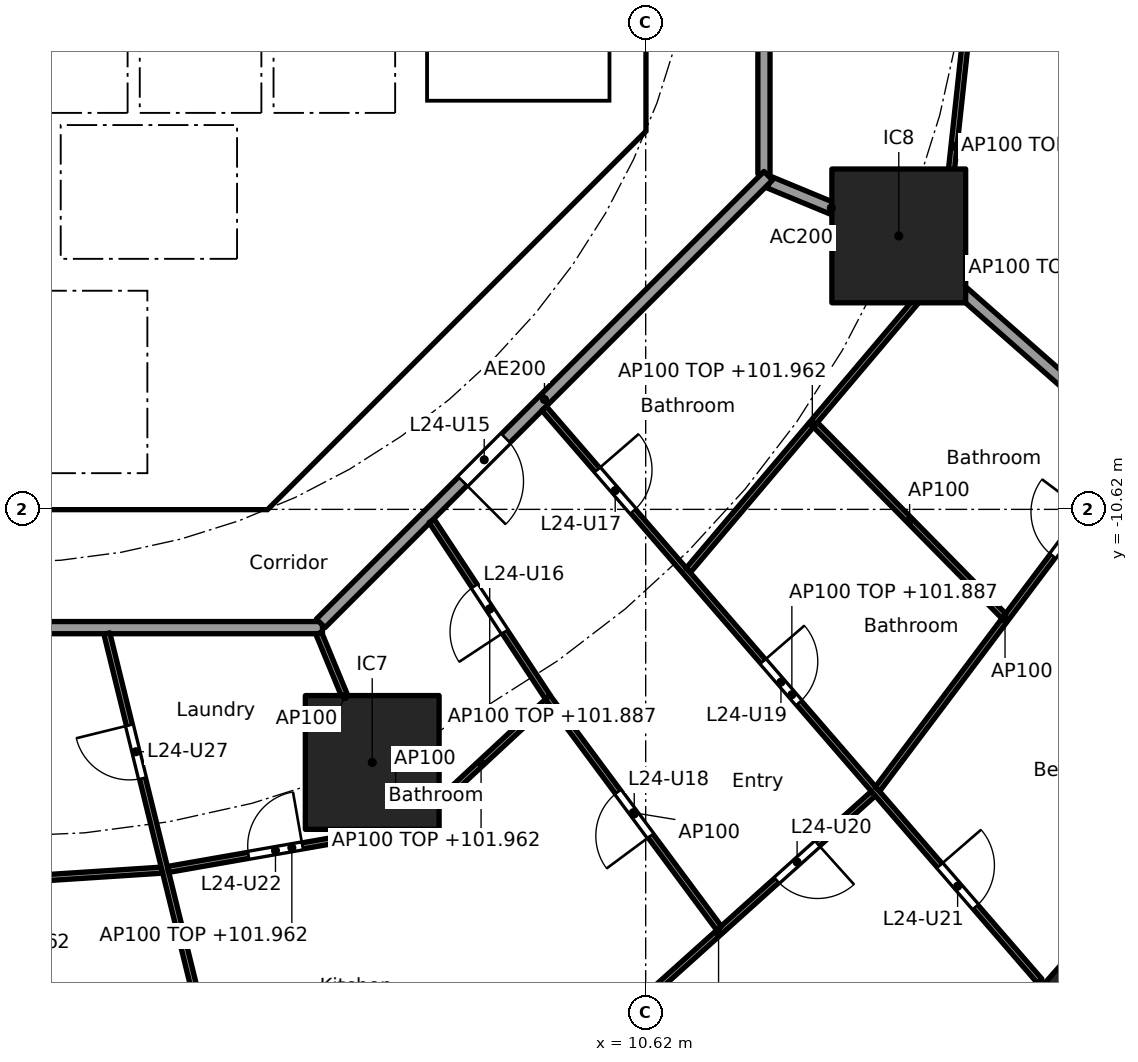
"""IFC4 building model, lengths in metres.
Left out: names, types, materials, properties, quantities, classifications, styles, units other than length and angle.
Written with IfcOpenShell. Run it as: python <this file> out.ifc"""

import sys

from ifc_helpers import new_model, si_unit, direction, frame, frame_2d, origin, origin_2d, place, context, subcontext, project, spatial, polyline, rectangle, hollow_rectangle, outline, extrude, element, fill, save


model = new_model("IFC4")
c1 = context("Model", 3, precision=1e-05, world=origin(), true_north=direction((0.0, 1.0)))
c2 = subcontext(c1, "Body", "Model", "MODEL_VIEW")
j1 = project(units=[si_unit("LENGTHUNIT", "METRE"), si_unit("PLANEANGLEUNIT", "RADIAN")], contexts=[c1])
p1 = place(None, origin())
s1 = spatial("IfcSite", under=j1, at=p1, CompositionType="ELEMENT")
p2 = place(p1, origin())
s2 = spatial("IfcBuilding", under=s1, at=p2, CompositionType="ELEMENT")
p3 = place(p2, frame((0.0, 0.0, 99.2)))
s3 = spatial("IfcBuildingStorey", under=s2, at=p3, CompositionType="ELEMENT", Elevation=99.2)
p4 = place(p3, frame((17.43, -18.813, 0.0), z_axis=(0.0, 0.0, 1.0), x_axis=(0.660114607735, 0.751164898445, 0.0)))
e1 = element("IfcColumn", 1, at=p4, inside=s3, PredefinedType="COLUMN", context=c2, shape_type="SweptSolid", body=[
    extrude(hollow_rectangle(XDim=1.3, YDim=0.9, WallThickness=0.045, at=origin_2d()), origin(), (0.0, 0.0, 1.0), 3.7),
])
for number, where, z_axis, x_axis in (
    (2, (6.123, -14.782, 0.0), (0.0, 0.0, 1.0), (1.0, 0.0, 0.0)),
    (3, (14.782, -6.123, 0.0), (0.0, 0.0, 1.0), (1.0, 0.0, 0.0)),
):
    element("IfcColumn", number, at=place(p3, frame(where, z_axis=z_axis, x_axis=x_axis)), inside=s3, PredefinedType="COLUMN", context=c2, shape_type="SweptSolid", body=[
        extrude(rectangle(XDim=2.2, YDim=2.2, at=origin_2d()), origin(), (0.0, 0.0, 1.0), 3.7),
    ])
p5 = place(p3, frame((4.613, -9.988, 0.0), z_axis=(0.0, 0.0, 1.0), x_axis=(0.707106781187, 0.707106781187, 0.0)))
e4 = element("IfcWall", 4, at=p5, inside=s3, PredefinedType="SHEAR", context=c2, shape_type="SweptSolid", body=[
    extrude(rectangle(XDim=7.602, YDim=0.6, at=frame_2d((3.801, 0.0))), origin(), (0.0, 0.0, 1.0), 3.44),
])
p6 = place(p5, frame((3.201, 0.0, 0.0)))
e5 = element("IfcOpeningElement", 5, at=p6, cuts=e4, PredefinedType="OPENING", context=c2, shape_type="SweptSolid", body=[
    extrude(rectangle(XDim=1.2, YDim=2.1, at=frame_2d((0.6, 1.05))), frame((0.0, 0.31, 0.0), z_axis=(0.0, -1.0, 0.0), x_axis=(1.0, 0.0, 0.0)), (0.0, 0.0, 1.0), 0.62),
])
p7 = place(p3, frame((4.0, -10.025, 0.0), z_axis=(0.0, 0.0, 1.0), x_axis=(0.0, 1.0, 0.0)))
e6 = element("IfcWall", 6, at=p7, inside=s3, PredefinedType="SOLIDWALL", context=c2, shape_type="SweptSolid", body=[
    extrude(rectangle(XDim=3.0, YDim=0.2, at=frame_2d((1.5, 0.0))), origin(), (0.0, 0.0, 1.0), 3.44),
])
p8 = place(p7, frame((0.975, 0.0, 0.0)))
e7 = element("IfcOpeningElement", 7, at=p8, cuts=e6, PredefinedType="OPENING", context=c2, shape_type="SweptSolid", body=[
    extrude(rectangle(XDim=1.1, YDim=2.1, at=frame_2d((0.55, 1.05))), frame((0.0, 0.11, 0.0), z_axis=(0.0, -1.0, 0.0), x_axis=(1.0, 0.0, 0.0)), (0.0, 0.0, 1.0), 0.22),
])
p9 = place(p3, frame((4.0, -6.5, 0.0), z_axis=(0.0, 0.0, 1.0), x_axis=(0.0, 1.0, 0.0)))
e8 = element("IfcWall", 8, at=p9, inside=s3, PredefinedType="SOLIDWALL", context=c2, shape_type="SweptSolid", body=[
    extrude(rectangle(XDim=2.2, YDim=0.2, at=frame_2d((1.1, 0.0))), origin(), (0.0, 0.0, 1.0), 3.44),
])
p10 = place(p9, frame((0.55, 0.0, 0.0)))
e9 = element("IfcOpeningElement", 9, at=p10, cuts=e8, PredefinedType="OPENING", context=c2, shape_type="SweptSolid", body=[
    extrude(rectangle(XDim=1.1, YDim=2.1, at=frame_2d((0.55, 1.05))), frame((0.0, 0.11, 0.0), z_axis=(0.0, -1.0, 0.0), x_axis=(1.0, 0.0, 0.0)), (0.0, 0.0, 1.0), 0.22),
])
p11 = place(p3, origin())
e10 = element("IfcWall", 10, at=p11, inside=s3, PredefinedType="SHEAR", context=c2, shape_type="SweptSolid", body=[
    extrude(outline(polyline([(-4.152, -10.025), (4.152, -10.025), (4.401, -9.776), (4.825, -10.2), (4.401, -10.625), (-4.401, -10.625), (-4.825, -10.2), (-4.401, -9.776), (-4.152, -10.025)])), origin(), (0.0, 0.0, 1.0), 3.44),
])
p12 = place(p3, origin())
e11 = element("IfcWall", 11, at=p12, inside=s3, PredefinedType="SHEAR", context=c2, shape_type="SweptSolid", body=[
    extrude(outline(polyline([(9.776, -4.401), (10.025, -4.152), (10.025, -3.801), (10.025, 4.152), (9.776, 4.401), (10.2, 4.825), (10.625, 4.401), (10.625, -4.401), (10.2, -4.825), (9.776, -4.401)])), origin(), (0.0, 0.0, 1.0), 3.44),
])
p13 = place(p3, frame((0.9, -6.5, 0.0), z_axis=(0.0, 0.0, 1.0), x_axis=(0.0, 1.0, 0.0)))
e12 = element("IfcWall", 12, at=p13, inside=s3, PredefinedType="SOLIDWALL", context=c2, shape_type="SweptSolid", body=[
    extrude(rectangle(XDim=2.2, YDim=0.2, at=frame_2d((1.1, 0.0))), origin(), (0.0, 0.0, 1.0), 3.44),
])
p14 = place(p3, origin())
e13 = element("IfcWall", 13, at=p14, inside=s3, PredefinedType="SOLIDWALL", context=c2, shape_type="SweptSolid", body=[
    extrude(outline(polyline([(-6.7, -2.1), (-6.5, -2.1), (-6.5, -4.1), (-4.5, -4.1), (-4.5, -2.1), (-4.3, -2.1), (-4.3, -4.1), (-2.3, -4.1), (-2.3, -2.1), (-2.1, -2.1), (-2.1, -4.1), (-0.1, -4.1), (-0.1, -2.1), (0.1, -2.1), (0.1, -4.1), (2.1, -4.1), (2.1, -2.1), (2.3, -2.1), (2.3, -4.1), (4.3, -4.1), (4.3, -2.1), (4.5, -2.1), (4.5, -4.1), (6.5, -4.1), (6.5, -2.1), (6.7, -2.1), (6.7, -4.3), (-6.7, -4.3), (-6.7, -2.1)])), origin(), (0.0, 0.0, 1.0), 3.44),
])
p15 = place(p3, origin())
e14 = element("IfcWall", 14, at=p15, inside=s3, PredefinedType="SOLIDWALL", context=c2, shape_type="SweptSolid", body=[
    extrude(outline(polyline([(4.1, -7.025), (-4.1, -7.025), (-4.1, -6.5), (4.1, -6.5), (4.1, -7.025)])), origin(), (0.0, 0.0, 1.0), 3.44),
])
p16 = place(p3, origin())
e15 = element("IfcWall", 15, at=p16, inside=s3, PredefinedType="SOLIDWALL", context=c2, shape_type="SweptSolid", body=[
    extrude(outline(polyline([(7.025, -3.9), (6.7, -3.9), (6.7, 3.9), (7.025, 3.9), (7.025, -3.9)])), origin(), (0.0, 0.0, 1.0), 3.44),
])
p17 = place(p3, origin())
e16 = element("IfcWall", 16, at=p17, inside=s3, PredefinedType="SOLIDWALL", context=c2, shape_type="SweptSolid", body=[
    extrude(outline(polyline([(10.025, -4.1), (6.7, -4.1), (6.7, -3.9), (10.025, -3.9), (10.025, -4.1)])), origin(), (0.0, 0.0, 1.0), 3.44),
])
p18 = place(p3, frame((12.657, -5.243, 0.0), z_axis=(0.0, 0.0, 1.0), x_axis=(0.923876145736, -0.382691608661, 0.0)))
e17 = element("IfcWall", 17, at=p18, inside=s3, PredefinedType="PARTITIONING", context=c2, shape_type="SweptSolid", body=[
    extrude(rectangle(XDim=2.2, YDim=0.2, at=frame_2d((1.1, 0.0))), origin(), (0.0, 0.0, 1.0), 3.44),
])
p19 = place(p3, frame((14.82, -6.156, 0.0), z_axis=(0.0, 0.0, 1.0), x_axis=(0.750582231659, -0.660777052808, 0.0)))
e18 = element("IfcWall", 18, at=p19, inside=s3, PredefinedType="PARTITIONING", context=c2, shape_type="SweptSolid", body=[
    extrude(rectangle(XDim=8.781, YDim=0.2, at=frame_2d((4.391, 0.0))), origin(), (0.0, 0.0, 1.0), 2.762),
])
p20 = place(p3, frame((12.565, -5.104, 0.0), z_axis=(0.0, 0.0, 1.0), x_axis=(0.0, 1.0, 0.0)))
e19 = element("IfcWall", 19, at=p20, inside=s3, PredefinedType="PARTITIONING", context=c2, shape_type="SweptSolid", body=[
    extrude(rectangle(XDim=10.209, YDim=0.2, at=frame_2d((5.104, 0.0))), origin(), (0.0, 0.0, 1.0), 3.44),
])
p21 = place(p3, frame((-5.104, -12.565, 0.0), z_axis=(0.0, 0.0, 1.0), x_axis=(1.0, 0.0, 0.0)))
e20 = element("IfcWall", 20, at=p21, inside=s3, PredefinedType="PARTITIONING", context=c2, shape_type="SweptSolid", body=[
    extrude(rectangle(XDim=10.409, YDim=0.2, at=frame_2d((5.205, 0.0))), origin(), (0.0, 0.0, 1.0), 3.44),
])
p22 = place(p3, frame((5.275, -12.494, 0.0), z_axis=(0.0, 0.0, 1.0), x_axis=(0.707106781187, 0.707106781187, 0.0)))
e21 = element("IfcWall", 21, at=p22, inside=s3, PredefinedType="PARTITIONING", context=c2, shape_type="SweptSolid", body=[
    extrude(rectangle(XDim=10.409, YDim=0.2, at=frame_2d((5.205, 0.0))), origin(), (0.0, 0.0, 1.0), 3.44),
])
p23 = place(p22, frame((3.303, 0.0, 0.0)))
e22 = element("IfcOpeningElement", 22, at=p23, cuts=e21, PredefinedType="OPENING", context=c2, shape_type="SweptSolid", body=[
    extrude(rectangle(XDim=1.0, YDim=2.1, at=frame_2d((0.5, 1.05))), frame((0.0, 0.11, 0.0), z_axis=(0.0, -1.0, 0.0), x_axis=(1.0, 0.0, 0.0)), (0.0, 0.0, 1.0), 0.22),
])
p24 = place(p3, frame((-1.703, -16.836, 0.0), z_axis=(0.0, 0.0, 1.0), x_axis=(0.997897941075, 0.064805086209, 0.0)))
e23 = element("IfcWall", 23, at=p24, inside=s3, PredefinedType="PARTITIONING", context=c2, shape_type="SweptSolid", body=[
    extrude(rectangle(XDim=4.378, YDim=0.1, at=frame_2d((2.189, 0.0))), origin(), (0.0, 0.0, 1.0), 2.762),
])
p25 = place(p3, frame((1.759, -12.662, 0.0), z_axis=(0.0, 0.0, 1.0), x_axis=(0.239021819854, -0.971014196412, 0.0)))
e24 = element("IfcWall", 24, at=p25, inside=s3, PredefinedType="PARTITIONING", context=c2, shape_type="SweptSolid", body=[
    extrude(rectangle(XDim=14.05, YDim=0.1, at=frame_2d((7.025, 0.0))), origin(), (0.0, 0.0, 1.0), 2.687),
])
p26 = place(p25, frame((6.214, 0.0, 0.0)))
e25 = element("IfcOpeningElement", 25, at=p26, cuts=e24, PredefinedType="OPENING", context=c2, shape_type="SweptSolid", body=[
    extrude(rectangle(XDim=0.9, YDim=2.1, at=frame_2d((0.45, 1.05))), frame((0.0, 0.06, 0.0), z_axis=(0.0, -1.0, 0.0), x_axis=(1.0, 0.0, 0.0)), (0.0, 0.0, 1.0), 0.12),
])
p27 = place(p25, frame((1.552, 0.0, 0.0)))
e26 = element("IfcOpeningElement", 26, at=p27, cuts=e24, PredefinedType="OPENING", context=c2, shape_type="SweptSolid", body=[
    extrude(rectangle(XDim=0.9, YDim=2.1, at=frame_2d((0.45, 1.05))), frame((0.0, 0.06, 0.0), z_axis=(0.0, -1.0, 0.0), x_axis=(1.0, 0.0, 0.0)), (0.0, 0.0, 1.0), 0.12),
])
p28 = place(p3, frame((2.765, -16.541, 0.0), z_axis=(0.0, 0.0, 1.0), x_axis=(0.984998612286, 0.172562260633, 0.0)))
e27 = element("IfcWall", 27, at=p28, inside=s3, PredefinedType="PARTITIONING", context=c2, shape_type="SweptSolid", body=[
    extrude(rectangle(XDim=4.134, YDim=0.1, at=frame_2d((2.067, 0.0))), origin(), (0.0, 0.0, 1.0), 2.762),
])
p29 = place(p28, frame((1.344, 0.0, 0.0)))
e28 = element("IfcOpeningElement", 28, at=p29, cuts=e27, PredefinedType="OPENING", context=c2, shape_type="SweptSolid", body=[
    extrude(rectangle(XDim=0.9, YDim=2.1, at=frame_2d((0.45, 1.05))), frame((0.0, 0.06, 0.0), z_axis=(0.0, -1.0, 0.0), x_axis=(1.0, 0.0, 0.0)), (0.0, 0.0, 1.0), 0.12),
])
p30 = place(p3, frame((5.243, -12.657, 0.0), z_axis=(0.0, 0.0, 1.0), x_axis=(0.382719158442, -0.923864733477, 0.0)))
e29 = element("IfcWall", 29, at=p30, inside=s3, PredefinedType="PARTITIONING", context=c2, shape_type="SweptSolid", body=[
    extrude(rectangle(XDim=2.25, YDim=0.1, at=frame_2d((1.125, 0.0))), origin(), (0.0, 0.0, 1.0), 3.44),
])
p31 = place(p3, frame((6.824, -15.802, 0.0), z_axis=(0.0, 0.0, 1.0), x_axis=(0.733007232109, 0.680220844782, 0.0)))
e30 = element("IfcWall", 30, at=p31, inside=s3, PredefinedType="PARTITIONING", context=c2, shape_type="SweptSolid", body=[
    extrude(rectangle(XDim=2.969, YDim=0.1, at=frame_2d((1.485, 0.0))), origin(), (0.0, 0.0, 1.0), 2.762),
])
p32 = place(p3, frame((9.272, -19.868, 0.0), z_axis=(0.0, 0.0, 1.0), x_axis=(0.743884413566, 0.668308296562, 0.0)))
e31 = element("IfcWall", 31, at=p32, inside=s3, PredefinedType="PARTITIONING", context=c2, shape_type="SweptSolid", body=[
    extrude(rectangle(XDim=6.845, YDim=0.1, at=frame_2d((3.423, 0.0))), origin(), (0.0, 0.0, 1.0), 2.762),
])
p33 = place(p32, frame((4.709, 0.0, 0.0)))
e32 = element("IfcOpeningElement", 32, at=p33, cuts=e31, PredefinedType="OPENING", context=c2, shape_type="SweptSolid", body=[
    extrude(rectangle(XDim=0.9, YDim=2.1, at=frame_2d((0.45, 1.05))), frame((0.0, 0.06, 0.0), z_axis=(0.0, -1.0, 0.0), x_axis=(1.0, 0.0, 0.0)), (0.0, 0.0, 1.0), 0.12),
])
p34 = place(p3, frame((7.1, -10.808, 0.0), z_axis=(0.0, 0.0, 1.0), x_axis=(0.550294419528, -0.834970689208, 0.0)))
e33 = element("IfcWall", 33, at=p34, inside=s3, PredefinedType="PARTITIONING", context=c2, shape_type="SweptSolid", body=[
    extrude(rectangle(XDim=3.472, YDim=0.1, at=frame_2d((1.736, 0.0))), origin(), (0.0, 0.0, 1.0), 2.687),
])
p35 = place(p34, frame((1.286, 0.0, 0.0)))
e34 = element("IfcOpeningElement", 34, at=p35, cuts=e33, PredefinedType="OPENING", context=c2, shape_type="SweptSolid", body=[
    extrude(rectangle(XDim=0.9, YDim=2.1, at=frame_2d((0.45, 1.05))), frame((0.0, 0.06, 0.0), z_axis=(0.0, -1.0, 0.0), x_axis=(1.0, 0.0, 0.0)), (0.0, 0.0, 1.0), 0.12),
])
p36 = place(p3, frame((9.008, -13.708, 0.0), z_axis=(0.0, 0.0, 1.0), x_axis=(0.595845850207, -0.803098825047, 0.0)))
e35 = element("IfcWall", 35, at=p36, inside=s3, PredefinedType="PARTITIONING", context=c2, shape_type="SweptSolid", body=[
    extrude(rectangle(XDim=4.729, YDim=0.1, at=frame_2d((2.365, 0.0))), origin(), (0.0, 0.0, 1.0), 3.44),
])
p37 = place(p36, frame((1.94, 0.0, 0.0)))
e36 = element("IfcOpeningElement", 36, at=p37, cuts=e35, PredefinedType="OPENING", context=c2, shape_type="SweptSolid", body=[
    extrude(rectangle(XDim=0.9, YDim=2.1, at=frame_2d((0.45, 1.05))), frame((0.0, 0.06, 0.0), z_axis=(0.0, -1.0, 0.0), x_axis=(1.0, 0.0, 0.0)), (0.0, 0.0, 1.0), 0.12),
])
p38 = place(p3, frame((8.95, -8.96, 0.0), z_axis=(0.0, 0.0, 1.0), x_axis=(0.65441081073, -0.756139200676, 0.0)))
e37 = element("IfcWall", 37, at=p38, inside=s3, PredefinedType="PARTITIONING", context=c2, shape_type="SweptSolid", body=[
    extrude(rectangle(XDim=12.451, YDim=0.1, at=frame_2d((6.226, 0.0))), origin(), (0.0, 0.0, 1.0), 2.687),
])
p39 = place(p38, frame((1.336, 0.0, 0.0)))
e38 = element("IfcOpeningElement", 38, at=p39, cuts=e37, PredefinedType="OPENING", context=c2, shape_type="SweptSolid", body=[
    extrude(rectangle(XDim=0.9, YDim=2.1, at=frame_2d((0.45, 1.05))), frame((0.0, 0.06, 0.0), z_axis=(0.0, -1.0, 0.0), x_axis=(1.0, 0.0, 0.0)), (0.0, 0.0, 1.0), 0.12),
])
p40 = place(p38, frame((5.501, 0.0, 0.0)))
e39 = element("IfcOpeningElement", 39, at=p40, cuts=e37, PredefinedType="OPENING", context=c2, shape_type="SweptSolid", body=[
    extrude(rectangle(XDim=0.9, YDim=2.1, at=frame_2d((0.45, 1.05))), frame((0.0, 0.06, 0.0), z_axis=(0.0, -1.0, 0.0), x_axis=(1.0, 0.0, 0.0)), (0.0, 0.0, 1.0), 0.12),
])
p41 = place(p38, frame((9.941, 0.0, 0.0)))
e40 = element("IfcOpeningElement", 40, at=p41, cuts=e37, PredefinedType="OPENING", context=c2, shape_type="SweptSolid", body=[
    extrude(rectangle(XDim=0.9, YDim=2.1, at=frame_2d((0.45, 1.05))), frame((0.0, 0.06, 0.0), z_axis=(0.0, -1.0, 0.0), x_axis=(1.0, 0.0, 0.0)), (0.0, 0.0, 1.0), 0.12),
])
p42 = place(p3, frame((11.32, -11.623, 0.0), z_axis=(0.0, 0.0, 1.0), x_axis=(0.646106810963, 0.763247003811, 0.0)))
e41 = element("IfcWall", 41, at=p42, inside=s3, PredefinedType="PARTITIONING", context=c2, shape_type="SweptSolid", body=[
    extrude(rectangle(XDim=6.317, YDim=0.1, at=frame_2d((3.159, 0.0))), origin(), (0.0, 0.0, 1.0), 2.762),
])
p43 = place(p3, frame((14.432, -15.219, 0.0), z_axis=(0.0, 0.0, 1.0), x_axis=(0.601001256685, 0.799248077548, 0.0)))
e42 = element("IfcWall", 42, at=p43, inside=s3, PredefinedType="PARTITIONING", context=c2, shape_type="SweptSolid", body=[
    extrude(rectangle(XDim=6.98, YDim=0.1, at=frame_2d((3.49, 0.0))), origin(), (0.0, 0.0, 1.0), 2.762),
])
p44 = place(p43, frame((4.798, 0.0, 0.0)))
e43 = element("IfcOpeningElement", 43, at=p44, cuts=e42, PredefinedType="OPENING", context=c2, shape_type="SweptSolid", body=[
    extrude(rectangle(XDim=0.9, YDim=2.1, at=frame_2d((0.45, 1.05))), frame((0.0, 0.06, 0.0), z_axis=(0.0, -1.0, 0.0), x_axis=(1.0, 0.0, 0.0)), (0.0, 0.0, 1.0), 0.12),
])
p45 = place(p3, frame((13.412, -9.229, 0.0), z_axis=(0.0, 0.0, 1.0), x_axis=(0.701611164285, -0.712560014421, 0.0)))
e44 = element("IfcWall", 44, at=p45, inside=s3, PredefinedType="PARTITIONING", context=c2, shape_type="SweptSolid", body=[
    extrude(rectangle(XDim=4.415, YDim=0.1, at=frame_2d((2.208, 0.0))), origin(), (0.0, 0.0, 1.0), 3.44),
])
p46 = place(p3, frame((15.477, -6.625, 0.0), z_axis=(0.0, 0.0, 1.0), x_axis=(0.107570517496, 0.994197457131, 0.0)))
e45 = element("IfcWall", 45, at=p46, inside=s3, PredefinedType="PARTITIONING", context=c2, shape_type="SweptSolid", body=[
    extrude(rectangle(XDim=3.972, YDim=0.1, at=frame_2d((1.986, 0.0))), origin(), (0.0, 0.0, 1.0), 2.762),
])
p47 = place(p3, frame((6.781, -15.638, 0.0), z_axis=(0.0, 0.0, 1.0), x_axis=(-0.533419461524, 0.845850860417, 0.0)))
e46 = element("IfcWall", 46, at=p47, inside=s3, PredefinedType="PARTITIONING", context=c2, shape_type="SweptSolid", body=[
    extrude(rectangle(XDim=1.025, YDim=0.1, at=frame_2d((0.513, 0.0))), origin(), (0.0, 0.0, 1.0), 3.44),
])
p48 = place(p10, origin())
e47 = element("IfcDoor", 47, at=p48, inside=s3, OperationType="DOUBLE_DOOR_SLIDING", PredefinedType="DOOR", context=c2, shape_type="SweptSolid", body=[
    extrude(rectangle(XDim=1.1, YDim=2.1, at=frame_2d((0.55, 1.05))), frame((0.0, 0.025, 0.0), z_axis=(0.0, -1.0, 0.0), x_axis=(1.0, 0.0, 0.0)), (0.0, 0.0, 1.0), 0.05),
])
fill(e9, e47)
p49 = place(p8, origin())
e48 = element("IfcDoor", 48, at=p49, inside=s3, OperationType="SINGLE_SWING_LEFT", PredefinedType="DOOR", context=c2, shape_type="SweptSolid", body=[
    extrude(rectangle(XDim=1.1, YDim=2.1, at=frame_2d((0.55, 1.05))), frame((0.0, 0.025, 0.0), z_axis=(0.0, -1.0, 0.0), x_axis=(1.0, 0.0, 0.0)), (0.0, 0.0, 1.0), 0.05),
])
fill(e7, e48)
p50 = place(p6, origin())
e49 = element("IfcDoor", 49, at=p50, inside=s3, OperationType="SINGLE_SWING_LEFT", PredefinedType="DOOR", context=c2, shape_type="SweptSolid", body=[
    extrude(rectangle(XDim=1.2, YDim=2.1, at=frame_2d((0.6, 1.05))), frame((0.0, 0.025, 0.0), z_axis=(0.0, -1.0, 0.0), x_axis=(1.0, 0.0, 0.0)), (0.0, 0.0, 1.0), 0.05),
])
fill(e5, e49)
p51 = place(p23, frame((1.0, 0.0, 0.0), x_axis=(-1.0, 0.0, 0.0)))
e50 = element("IfcDoor", 50, at=p51, inside=s3, OperationType="SINGLE_SWING_RIGHT", PredefinedType="DOOR", context=c2, shape_type="SweptSolid", body=[
    extrude(rectangle(XDim=1.0, YDim=2.1, at=frame_2d((0.5, 1.05))), frame((0.0, 0.025, 0.0), z_axis=(0.0, -1.0, 0.0), x_axis=(1.0, 0.0, 0.0)), (0.0, 0.0, 1.0), 0.05),
])
fill(e22, e50)
p52 = place(p35, frame((0.9, 0.0, 0.0), x_axis=(-1.0, 0.0, 0.0)))
e51 = element("IfcDoor", 51, at=p52, inside=s3, OperationType="SINGLE_SWING_LEFT", PredefinedType="DOOR", context=c2, shape_type="SweptSolid", body=[
    extrude(rectangle(XDim=0.9, YDim=2.1, at=frame_2d((0.45, 1.05))), frame((0.0, 0.025, 0.0), z_axis=(0.0, -1.0, 0.0), x_axis=(1.0, 0.0, 0.0)), (0.0, 0.0, 1.0), 0.05),
])
fill(e34, e51)
p53 = place(p39, origin())
e52 = element("IfcDoor", 52, at=p53, inside=s3, OperationType="SINGLE_SWING_LEFT", PredefinedType="DOOR", context=c2, shape_type="SweptSolid", body=[
    extrude(rectangle(XDim=0.9, YDim=2.1, at=frame_2d((0.45, 1.05))), frame((0.0, 0.025, 0.0), z_axis=(0.0, -1.0, 0.0), x_axis=(1.0, 0.0, 0.0)), (0.0, 0.0, 1.0), 0.05),
])
fill(e38, e52)
p54 = place(p37, frame((0.9, 0.0, 0.0), x_axis=(-1.0, 0.0, 0.0)))
e53 = element("IfcDoor", 53, at=p54, inside=s3, OperationType="SINGLE_SWING_LEFT", PredefinedType="DOOR", context=c2, shape_type="SweptSolid", body=[
    extrude(rectangle(XDim=0.9, YDim=2.1, at=frame_2d((0.45, 1.05))), frame((0.0, 0.025, 0.0), z_axis=(0.0, -1.0, 0.0), x_axis=(1.0, 0.0, 0.0)), (0.0, 0.0, 1.0), 0.05),
])
fill(e36, e53)
p55 = place(p40, origin())
e54 = element("IfcDoor", 54, at=p55, inside=s3, OperationType="SINGLE_SWING_LEFT", PredefinedType="DOOR", context=c2, shape_type="SweptSolid", body=[
    extrude(rectangle(XDim=0.9, YDim=2.1, at=frame_2d((0.45, 1.05))), frame((0.0, 0.025, 0.0), z_axis=(0.0, -1.0, 0.0), x_axis=(1.0, 0.0, 0.0)), (0.0, 0.0, 1.0), 0.05),
])
fill(e39, e54)
p56 = place(p33, frame((0.9, 0.0, 0.0), x_axis=(-1.0, 0.0, 0.0)))
e55 = element("IfcDoor", 55, at=p56, inside=s3, OperationType="SINGLE_SWING_LEFT", PredefinedType="DOOR", context=c2, shape_type="SweptSolid", body=[
    extrude(rectangle(XDim=0.9, YDim=2.1, at=frame_2d((0.45, 1.05))), frame((0.0, 0.025, 0.0), z_axis=(0.0, -1.0, 0.0), x_axis=(1.0, 0.0, 0.0)), (0.0, 0.0, 1.0), 0.05),
])
fill(e32, e55)
p57 = place(p41, origin())
e56 = element("IfcDoor", 56, at=p57, inside=s3, OperationType="SINGLE_SWING_LEFT", PredefinedType="DOOR", context=c2, shape_type="SweptSolid", body=[
    extrude(rectangle(XDim=0.9, YDim=2.1, at=frame_2d((0.45, 1.05))), frame((0.0, 0.025, 0.0), z_axis=(0.0, -1.0, 0.0), x_axis=(1.0, 0.0, 0.0)), (0.0, 0.0, 1.0), 0.05),
])
fill(e40, e56)
p58 = place(p29, origin())
e57 = element("IfcDoor", 57, at=p58, inside=s3, OperationType="SINGLE_SWING_RIGHT", PredefinedType="DOOR", context=c2, shape_type="SweptSolid", body=[
    extrude(rectangle(XDim=0.9, YDim=2.1, at=frame_2d((0.45, 1.05))), frame((0.0, 0.025, 0.0), z_axis=(0.0, -1.0, 0.0), x_axis=(1.0, 0.0, 0.0)), (0.0, 0.0, 1.0), 0.05),
])
fill(e28, e57)
p59 = place(p44, origin())
e58 = element("IfcDoor", 58, at=p59, inside=s3, OperationType="SINGLE_SWING_RIGHT", PredefinedType="DOOR", context=c2, shape_type="SweptSolid", body=[
    extrude(rectangle(XDim=0.9, YDim=2.1, at=frame_2d((0.45, 1.05))), frame((0.0, 0.025, 0.0), z_axis=(0.0, -1.0, 0.0), x_axis=(1.0, 0.0, 0.0)), (0.0, 0.0, 1.0), 0.05),
])
fill(e43, e58)
p60 = place(p27, frame((0.9, 0.0, 0.0), x_axis=(-1.0, 0.0, 0.0)))
e59 = element("IfcDoor", 59, at=p60, inside=s3, OperationType="SINGLE_SWING_RIGHT", PredefinedType="DOOR", context=c2, shape_type="SweptSolid", body=[
    extrude(rectangle(XDim=0.9, YDim=2.1, at=frame_2d((0.45, 1.05))), frame((0.0, 0.025, 0.0), z_axis=(0.0, -1.0, 0.0), x_axis=(1.0, 0.0, 0.0)), (0.0, 0.0, 1.0), 0.05),
])
fill(e26, e59)
save(model, sys.argv[1])
